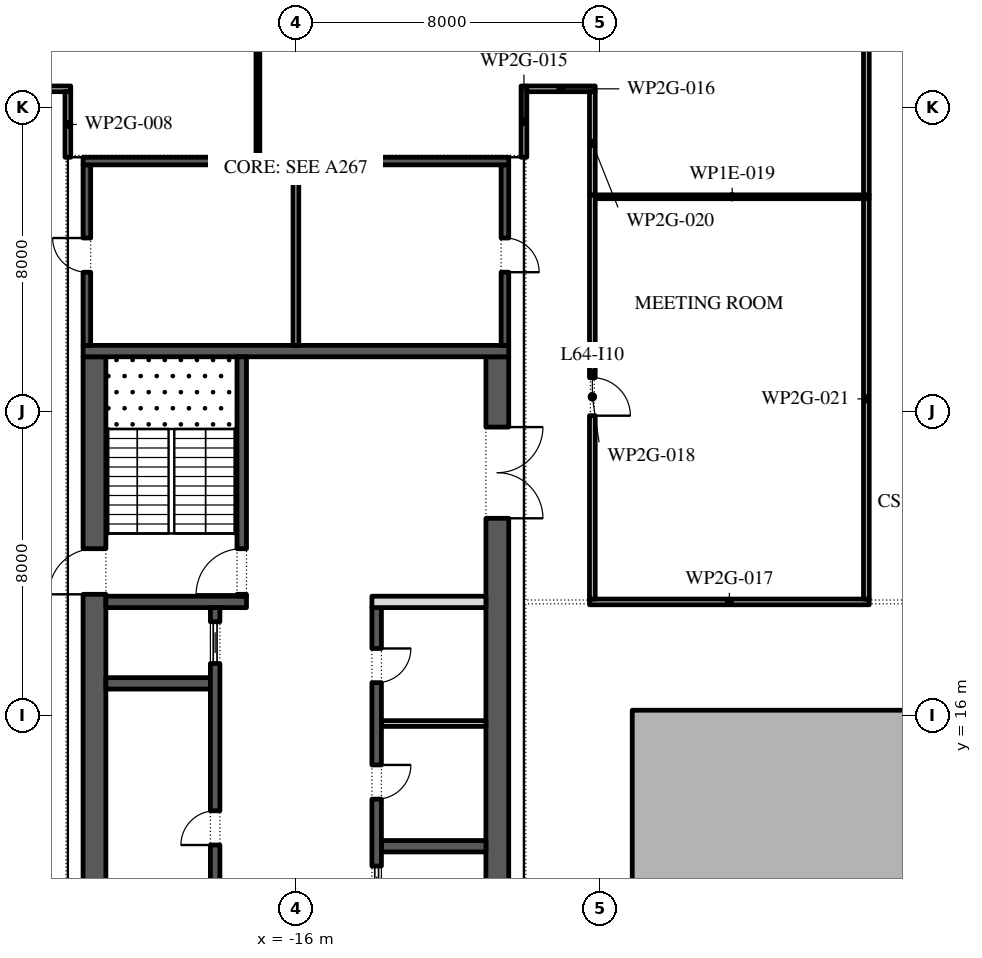
"""IFC4 building model, lengths in metres.
Left out: names, types, materials, properties, quantities, classifications, styles, units other than length and angle.
Written with IfcOpenShell. Run it as: python <this file> out.ifc"""

import sys

from ifc_helpers import new_model, si_unit, direction, frame, frame_2d, origin, place, context, subcontext, project, spatial, polyline, rectangle, outline, extrude, element, fill, save


model = new_model("IFC4")
c1 = context("Model", 3, precision=1e-05, world=origin(), true_north=direction((0.0, 1.0)))
c2 = subcontext(c1, "Body", "Model", "MODEL_VIEW")
j1 = project(units=[si_unit("LENGTHUNIT", "METRE"), si_unit("PLANEANGLEUNIT", "RADIAN")], contexts=[c1])
p1 = place(None, origin())
s1 = spatial("IfcSite", under=j1, at=p1, CompositionType="ELEMENT")
p2 = place(p1, origin())
s2 = spatial("IfcBuilding", under=s1, at=p2, CompositionType="ELEMENT")
p3 = place(p2, frame((0.0, 0.0, 293.4)))
s3 = spatial("IfcBuildingStorey", under=s2, at=p3, CompositionType="ELEMENT", Elevation=293.4)
p4 = place(p3, origin())
e1 = element("IfcWall", 1, at=p4, inside=s3, PredefinedType="STANDARD", context=c2, shape_type="SweptSolid", body=[
    extrude(outline(polyline([(-7.15, -2.15), (7.15, -2.15), (7.15, 16.15), (-7.15, 16.15), (-7.15, -2.15)]), holes=[polyline([(-7.0, -2.0), (-7.0, 16.0), (7.0, 16.0), (7.0, -2.0), (-7.0, -2.0)])]), origin(), (0.0, 0.0, 1.0), 3.75),
])
p5 = place(p3, frame((-21.3, -2.45, 0.0), z_axis=(0.0, 0.0, 1.0), x_axis=(0.0, 1.0, 0.0)))
e2 = element("IfcWall", 2, at=p5, inside=s3, PredefinedType="SHEAR", context=c2, shape_type="SweptSolid", body=[
    extrude(rectangle(XDim=27.9, YDim=0.6, at=frame_2d((13.95, 0.0))), origin(), (0.0, 0.0, 1.0), 3.75),
])
p6 = place(p5, frame((5.05, 0.0, 0.0)))
e3 = element("IfcOpeningElement", 3, at=p6, cuts=e2, PredefinedType="OPENING", context=c2, shape_type="SweptSolid", body=[
    extrude(rectangle(XDim=1.2, YDim=2.1, at=frame_2d((0.6, 1.05))), frame((0.0, 0.31, 0.0), z_axis=(0.0, -1.0, 0.0), x_axis=(1.0, 0.0, 0.0)), (0.0, 0.0, 1.0), 0.62),
])
p7 = place(p5, frame((21.65, 0.0, 0.0)))
e4 = element("IfcOpeningElement", 4, at=p7, cuts=e2, PredefinedType="OPENING", context=c2, shape_type="SweptSolid", body=[
    extrude(rectangle(XDim=1.2, YDim=2.1, at=frame_2d((0.6, 1.05))), frame((0.0, 0.31, 0.0), z_axis=(0.0, -1.0, 0.0), x_axis=(1.0, 0.0, 0.0)), (0.0, 0.0, 1.0), 0.62),
])
p8 = place(p3, frame((-10.7, -2.45, 0.0), z_axis=(0.0, 0.0, 1.0), x_axis=(0.0, 1.0, 0.0)))
e5 = element("IfcWall", 5, at=p8, inside=s3, PredefinedType="SHEAR", context=c2, shape_type="SweptSolid", body=[
    extrude(rectangle(XDim=27.9, YDim=0.6, at=frame_2d((13.95, 0.0))), origin(), (0.0, 0.0, 1.0), 3.75),
])
p9 = place(p8, frame((23.65, 0.0, 0.0)))
e6 = element("IfcOpeningElement", 6, at=p9, cuts=e5, PredefinedType="OPENING", context=c2, shape_type="SweptSolid", body=[
    extrude(rectangle(XDim=2.4, YDim=2.1, at=frame_2d((1.2, 1.05))), frame((0.0, 0.31, 0.0), z_axis=(0.0, -1.0, 0.0), x_axis=(1.0, 0.0, 0.0)), (0.0, 0.0, 1.0), 0.62),
])
p10 = place(p8, frame((1.087, 0.0, 0.0)))
e7 = element("IfcOpeningElement", 7, at=p10, cuts=e5, PredefinedType="OPENING", context=c2, shape_type="SweptSolid", body=[
    extrude(rectangle(XDim=0.9, YDim=2.1, at=frame_2d((0.45, 1.05))), frame((0.0, 0.31, 0.0), z_axis=(0.0, -1.0, 0.0), x_axis=(1.0, 0.0, 0.0)), (0.0, 0.0, 1.0), 0.62),
])
p11 = place(p8, frame((4.262, 0.0, 0.0)))
e8 = element("IfcOpeningElement", 8, at=p11, cuts=e5, PredefinedType="OPENING", context=c2, shape_type="SweptSolid", body=[
    extrude(rectangle(XDim=1.0, YDim=2.1, at=frame_2d((0.5, 1.05))), frame((0.0, 0.31, 0.0), z_axis=(0.0, -1.0, 0.0), x_axis=(1.0, 0.0, 0.0)), (0.0, 0.0, 1.0), 0.62),
])
p12 = place(p3, frame((-21.6, 25.6, 0.0), z_axis=(0.0, 0.0, 1.0), x_axis=(1.0, 0.0, 0.0)))
e9 = element("IfcWall", 9, at=p12, inside=s3, PredefinedType="SHEAR", context=c2, shape_type="SweptSolid", body=[
    extrude(rectangle(XDim=11.2, YDim=0.3, at=frame_2d((5.6, 0.0))), origin(), (0.0, 0.0, 1.0), 3.75),
])
p13 = place(p3, frame((-21.0, 19.0, 0.0), z_axis=(0.0, 0.0, 1.0), x_axis=(1.0, 0.0, 0.0)))
e10 = element("IfcWall", 10, at=p13, inside=s3, PredefinedType="SHEAR", context=c2, shape_type="SweptSolid", body=[
    extrude(rectangle(XDim=3.7, YDim=0.3, at=frame_2d((1.85, 0.0))), origin(), (0.0, 0.0, 1.0), 3.75),
])
p14 = place(p3, frame((-17.425, 19.15, 0.0), z_axis=(0.0, 0.0, 1.0), x_axis=(0.0, 1.0, 0.0)))
e11 = element("IfcWall", 11, at=p14, inside=s3, PredefinedType="SHEAR", context=c2, shape_type="SweptSolid", body=[
    extrude(rectangle(XDim=6.3, YDim=0.25, at=frame_2d((3.15, 0.0))), origin(), (0.0, 0.0, 1.0), 3.75),
])
p15 = place(p14, frame((0.05, 0.0, 0.0)))
e12 = element("IfcOpeningElement", 12, at=p15, cuts=e11, PredefinedType="OPENING", context=c2, shape_type="SweptSolid", body=[
    extrude(rectangle(XDim=1.2, YDim=2.1, at=frame_2d((0.6, 1.05))), frame((0.0, 0.135, 0.0), z_axis=(0.0, -1.0, 0.0), x_axis=(1.0, 0.0, 0.0)), (0.0, 0.0, 1.0), 0.27),
])
p16 = place(p3, frame((-21.0, 16.857, 0.0), z_axis=(0.0, 0.0, 1.0), x_axis=(1.0, 0.0, 0.0)))
e13 = element("IfcWall", 13, at=p16, inside=s3, PredefinedType="SHEAR", context=c2, shape_type="SweptSolid", body=[
    extrude(rectangle(XDim=2.75, YDim=0.3, at=frame_2d((1.375, 0.0))), origin(), (0.0, 0.0, 1.0), 3.75),
])
p17 = place(p3, frame((-18.125, 4.15, 0.0), z_axis=(0.0, 0.0, 1.0), x_axis=(0.0, 1.0, 0.0)))
e14 = element("IfcWall", 14, at=p17, inside=s3, PredefinedType="SHEAR", context=c2, shape_type="SweptSolid", body=[
    extrude(rectangle(XDim=14.7, YDim=0.25, at=frame_2d((7.35, 0.0))), origin(), (0.0, 0.0, 1.0), 3.75),
])
p18 = place(p17, frame((3.246, 0.0, 0.0)))
e15 = element("IfcOpeningElement", 15, at=p18, cuts=e14, PredefinedType="OPENING", context=c2, shape_type="SweptSolid", body=[
    extrude(rectangle(XDim=0.9, YDim=2.1, at=frame_2d((0.45, 1.05))), frame((0.0, 0.135, 0.0), z_axis=(0.0, -1.0, 0.0), x_axis=(1.0, 0.0, 0.0)), (0.0, 0.0, 1.0), 0.27),
])
p19 = place(p17, frame((8.454, 0.0, 0.0)))
e16 = element("IfcOpeningElement", 16, at=p19, cuts=e14, PredefinedType="OPENING", context=c2, shape_type="SweptSolid", body=[
    extrude(rectangle(XDim=0.9, YDim=2.1, at=frame_2d((0.45, 1.05))), frame((0.0, 0.135, 0.0), z_axis=(0.0, -1.0, 0.0), x_axis=(1.0, 0.0, 0.0)), (0.0, 0.0, 1.0), 0.27),
])
p20 = place(p17, frame((0.371, 0.0, 0.0)))
e17 = element("IfcOpeningElement", 17, at=p20, cuts=e14, PredefinedType="OPENING", context=c2, shape_type="SweptSolid", body=[
    extrude(rectangle(XDim=1.1, YDim=2.1, at=frame_2d((0.55, 1.05))), frame((0.0, 0.135, 0.0), z_axis=(0.0, -1.0, 0.0), x_axis=(1.0, 0.0, 0.0)), (0.0, 0.0, 1.0), 0.27),
])
p21 = place(p17, frame((13.229, 0.0, 0.0)))
e18 = element("IfcOpeningElement", 18, at=p21, cuts=e14, PredefinedType="OPENING", context=c2, shape_type="SweptSolid", body=[
    extrude(rectangle(XDim=1.1, YDim=2.1, at=frame_2d((0.55, 1.05))), frame((0.0, 0.135, 0.0), z_axis=(0.0, -1.0, 0.0), x_axis=(1.0, 0.0, 0.0)), (0.0, 0.0, 1.0), 0.27),
])
p22 = place(p3, frame((-13.75, 12.571, 0.0), z_axis=(0.0, 0.0, 1.0), x_axis=(1.0, 0.0, 0.0)))
e19 = element("IfcWall", 19, at=p22, inside=s3, PredefinedType="SHEAR", context=c2, shape_type="SweptSolid", body=[
    extrude(rectangle(XDim=2.75, YDim=0.3, at=frame_2d((1.375, 0.0))), origin(), (0.0, 0.0, 1.0), 3.75),
])
p23 = place(p3, frame((-13.875, -2.45, 0.0), z_axis=(0.0, 0.0, 1.0), x_axis=(0.0, 1.0, 0.0)))
e20 = element("IfcWall", 20, at=p23, inside=s3, PredefinedType="SHEAR", context=c2, shape_type="SweptSolid", body=[
    extrude(rectangle(XDim=21.3, YDim=0.25, at=frame_2d((10.65, 0.0))), origin(), (0.0, 0.0, 1.0), 3.75),
])
p24 = place(p23, frame((16.261, 0.0, 0.0)))
e21 = element("IfcOpeningElement", 21, at=p24, cuts=e20, PredefinedType="OPENING", context=c2, shape_type="SweptSolid", body=[
    extrude(rectangle(XDim=0.9, YDim=2.1, at=frame_2d((0.45, 1.05))), frame((0.0, 0.135, 0.0), z_axis=(0.0, -1.0, 0.0), x_axis=(1.0, 0.0, 0.0)), (0.0, 0.0, 1.0), 0.27),
])
p25 = place(p23, frame((19.325, 0.0, 0.0)))
e22 = element("IfcOpeningElement", 22, at=p25, cuts=e20, PredefinedType="OPENING", context=c2, shape_type="SweptSolid", body=[
    extrude(rectangle(XDim=0.9, YDim=2.1, at=frame_2d((0.45, 1.05))), frame((0.0, 0.135, 0.0), z_axis=(0.0, -1.0, 0.0), x_axis=(1.0, 0.0, 0.0)), (0.0, 0.0, 1.0), 0.27),
])
p26 = place(p23, frame((6.971, 0.0, 0.0)))
e23 = element("IfcOpeningElement", 23, at=p26, cuts=e20, PredefinedType="OPENING", context=c2, shape_type="SweptSolid", body=[
    extrude(rectangle(XDim=1.1, YDim=2.1, at=frame_2d((0.55, 1.05))), frame((0.0, 0.135, 0.0), z_axis=(0.0, -1.0, 0.0), x_axis=(1.0, 0.0, 0.0)), (0.0, 0.0, 1.0), 0.27),
])
p27 = place(p23, frame((9.114, 0.0, 0.0)))
e24 = element("IfcOpeningElement", 24, at=p27, cuts=e20, PredefinedType="OPENING", context=c2, shape_type="SweptSolid", body=[
    extrude(rectangle(XDim=1.1, YDim=2.1, at=frame_2d((0.55, 1.05))), frame((0.0, 0.135, 0.0), z_axis=(0.0, -1.0, 0.0), x_axis=(1.0, 0.0, 0.0)), (0.0, 0.0, 1.0), 0.27),
])
p28 = place(p23, frame((11.257, 0.0, 0.0)))
e25 = element("IfcOpeningElement", 25, at=p28, cuts=e20, PredefinedType="OPENING", context=c2, shape_type="SweptSolid", body=[
    extrude(rectangle(XDim=1.1, YDim=2.1, at=frame_2d((0.55, 1.05))), frame((0.0, 0.135, 0.0), z_axis=(0.0, -1.0, 0.0), x_axis=(1.0, 0.0, 0.0)), (0.0, 0.0, 1.0), 0.27),
])
p29 = place(p23, frame((13.4, 0.0, 0.0)))
e26 = element("IfcOpeningElement", 26, at=p29, cuts=e20, PredefinedType="OPENING", context=c2, shape_type="SweptSolid", body=[
    extrude(rectangle(XDim=1.1, YDim=2.1, at=frame_2d((0.55, 1.05))), frame((0.0, 0.135, 0.0), z_axis=(0.0, -1.0, 0.0), x_axis=(1.0, 0.0, 0.0)), (0.0, 0.0, 1.0), 0.27),
])
p30 = place(p3, frame((-14.0, 19.0, 0.0), z_axis=(0.0, 0.0, 1.0), x_axis=(1.0, 0.0, 0.0)))
e27 = element("IfcWall", 27, at=p30, inside=s3, PredefinedType="PARTITIONING", context=c2, shape_type="SweptSolid", body=[
    extrude(rectangle(XDim=3.0, YDim=0.3, at=frame_2d((1.5, 0.0))), origin(), (0.0, 0.0, 1.0), 3.75),
])
p31 = place(p3, frame((-13.75, 15.8, 0.0), z_axis=(0.0, 0.0, 1.0), x_axis=(1.0, 0.0, 0.0)))
e28 = element("IfcWall", 28, at=p31, inside=s3, PredefinedType="PARTITIONING", context=c2, shape_type="SweptSolid", body=[
    extrude(rectangle(XDim=2.75, YDim=0.15, at=frame_2d((1.375, 0.0))), origin(), (0.0, 0.0, 1.0), 3.75),
])
p32 = place(p3, frame((-21.5, 25.75, 0.0), z_axis=(0.0, 0.0, 1.0), x_axis=(0.0, 1.0, 0.0)))
e29 = element("IfcWall", 29, at=p32, inside=s3, PredefinedType="SHEAR", context=c2, shape_type="SweptSolid", body=[
    extrude(rectangle(XDim=4.75, YDim=0.2, at=frame_2d((2.375, 0.0))), origin(), (0.0, 0.0, 1.0), 3.75),
])
p33 = place(p32, frame((1.925, 0.0, 0.0)))
e30 = element("IfcOpeningElement", 30, at=p33, cuts=e29, PredefinedType="OPENING", context=c2, shape_type="SweptSolid", body=[
    extrude(rectangle(XDim=0.9, YDim=2.1, at=frame_2d((0.45, 1.05))), frame((0.0, 0.11, 0.0), z_axis=(0.0, -1.0, 0.0), x_axis=(1.0, 0.0, 0.0)), (0.0, 0.0, 1.0), 0.22),
])
p34 = place(p3, frame((-10.5, 25.75, 0.0), z_axis=(0.0, 0.0, 1.0), x_axis=(0.0, 1.0, 0.0)))
e31 = element("IfcWall", 31, at=p34, inside=s3, PredefinedType="SHEAR", context=c2, shape_type="SweptSolid", body=[
    extrude(rectangle(XDim=4.75, YDim=0.2, at=frame_2d((2.375, 0.0))), origin(), (0.0, 0.0, 1.0), 3.75),
])
p35 = place(p34, frame((1.925, 0.0, 0.0)))
e32 = element("IfcOpeningElement", 32, at=p35, cuts=e31, PredefinedType="OPENING", context=c2, shape_type="SweptSolid", body=[
    extrude(rectangle(XDim=0.9, YDim=2.1, at=frame_2d((0.45, 1.05))), frame((0.0, 0.11, 0.0), z_axis=(0.0, -1.0, 0.0), x_axis=(1.0, 0.0, 0.0)), (0.0, 0.0, 1.0), 0.22),
])
p36 = place(p3, frame((-21.6, 30.6, 0.0), z_axis=(0.0, 0.0, 1.0), x_axis=(1.0, 0.0, 0.0)))
e33 = element("IfcWall", 33, at=p36, inside=s3, PredefinedType="SHEAR", context=c2, shape_type="SweptSolid", body=[
    extrude(rectangle(XDim=11.2, YDim=0.2, at=frame_2d((5.6, 0.0))), origin(), (0.0, 0.0, 1.0), 3.75),
])
p37 = place(p3, frame((-16.0, 25.75, 0.0), z_axis=(0.0, 0.0, 1.0), x_axis=(0.0, 1.0, 0.0)))
e34 = element("IfcWall", 34, at=p37, inside=s3, PredefinedType="PARTITIONING", context=c2, shape_type="SweptSolid", body=[
    extrude(rectangle(XDim=4.75, YDim=0.15, at=frame_2d((2.375, 0.0))), origin(), (0.0, 0.0, 1.0), 3.75),
])
p38 = place(p3, frame((-23.8, 32.5, 0.0), z_axis=(0.0, 0.0, 1.0), x_axis=(1.0, 0.0, 0.0)))
e35 = element("IfcWall", 35, at=p38, inside=s3, PredefinedType="PARTITIONING", context=c2, shape_type="SweptSolid", body=[
    extrude(rectangle(XDim=1.875, YDim=0.15, at=frame_2d((0.938, 0.0))), origin(), (0.0, 0.0, 1.0), 3.75),
])
p39 = place(p3, frame((-22.0, 32.425, 0.0), z_axis=(0.0, 0.0, 1.0), x_axis=(0.0, -1.0, 0.0)))
e36 = element("IfcWall", 36, at=p39, inside=s3, PredefinedType="PARTITIONING", context=c2, shape_type="SweptSolid", body=[
    extrude(rectangle(XDim=1.725, YDim=0.15, at=frame_2d((0.863, 0.0))), origin(), (0.0, 0.0, 1.0), 3.75),
])
p40 = place(p3, frame((-17.0, 41.95, 0.0), z_axis=(0.0, 0.0, 1.0), x_axis=(0.0, -1.0, 0.0)))
e37 = element("IfcWall", 37, at=p40, inside=s3, PredefinedType="PARTITIONING", context=c2, shape_type="SweptSolid", body=[
    extrude(rectangle(XDim=11.25, YDim=0.1, at=frame_2d((5.625, 0.0))), origin(), (0.0, 0.0, 1.0), 3.75),
])
p41 = place(p40, frame((3.9, 0.0, 0.0)))
e38 = element("IfcOpeningElement", 38, at=p41, cuts=e37, PredefinedType="OPENING", context=c2, shape_type="SweptSolid", body=[
    extrude(rectangle(XDim=0.9, YDim=2.1, at=frame_2d((0.45, 1.05))), frame((0.0, 0.06, 0.0), z_axis=(0.0, -1.0, 0.0), x_axis=(1.0, 0.0, 0.0)), (0.0, 0.0, 1.0), 0.12),
])
p42 = place(p3, frame((-10.0, 30.7, 0.0), z_axis=(0.0, 0.0, 1.0), x_axis=(0.0, 1.0, 0.0)))
e39 = element("IfcWall", 39, at=p42, inside=s3, PredefinedType="PARTITIONING", context=c2, shape_type="SweptSolid", body=[
    extrude(rectangle(XDim=1.875, YDim=0.15, at=frame_2d((0.938, 0.0))), origin(), (0.0, 0.0, 1.0), 3.75),
])
p43 = place(p3, frame((-9.925, 32.5, 0.0), z_axis=(0.0, 0.0, 1.0), x_axis=(1.0, 0.0, 0.0)))
e40 = element("IfcWall", 40, at=p43, inside=s3, PredefinedType="PARTITIONING", context=c2, shape_type="SweptSolid", body=[
    extrude(rectangle(XDim=1.8, YDim=0.15, at=frame_2d((0.9, 0.0))), origin(), (0.0, 0.0, 1.0), 3.75),
])
p44 = place(p3, frame((-8.275, 19.0, 0.0), z_axis=(0.0, 0.0, 1.0), x_axis=(1.0, 0.0, 0.0)))
e41 = element("IfcWall", 41, at=p44, inside=s3, PredefinedType="PARTITIONING", context=c2, shape_type="SweptSolid", body=[
    extrude(rectangle(XDim=7.36, YDim=0.15, at=frame_2d((3.68, 0.0))), origin(), (0.0, 0.0, 1.0), 3.75),
])
p45 = place(p3, frame((-8.2, 29.71, 0.0), z_axis=(0.0, 0.0, 1.0), x_axis=(0.0, -1.0, 0.0)))
e42 = element("IfcWall", 42, at=p45, inside=s3, PredefinedType="PARTITIONING", context=c2, shape_type="SweptSolid", body=[
    extrude(rectangle(XDim=10.635, YDim=0.15, at=frame_2d((5.317, 0.0))), origin(), (0.0, 0.0, 1.0), 3.75),
])
p46 = place(p45, frame((4.81, 0.0, 0.0)))
e43 = element("IfcOpeningElement", 43, at=p46, cuts=e42, PredefinedType="OPENING", context=c2, shape_type="SweptSolid", body=[
    extrude(rectangle(XDim=1.0, YDim=2.1, at=frame_2d((0.5, 1.05))), frame((0.0, 0.085, 0.0), z_axis=(0.0, -1.0, 0.0), x_axis=(1.0, 0.0, 0.0)), (0.0, 0.0, 1.0), 0.17),
])
p47 = place(p3, frame((-8.125, 29.66, 0.0), z_axis=(0.0, 0.0, 1.0), x_axis=(1.0, 0.0, 0.0)))
e44 = element("IfcWall", 44, at=p47, inside=s3, PredefinedType="PARTITIONING", context=c2, shape_type="SweptSolid", body=[
    extrude(rectangle(XDim=7.21, YDim=0.1, at=frame_2d((3.605, 0.0))), origin(), (0.0, 0.0, 1.0), 3.75),
])
p48 = place(p3, frame((-8.2, 32.425, 0.0), z_axis=(0.0, 0.0, 1.0), x_axis=(0.0, -1.0, 0.0)))
e45 = element("IfcWall", 45, at=p48, inside=s3, PredefinedType="PARTITIONING", context=c2, shape_type="SweptSolid", body=[
    extrude(rectangle(XDim=2.715, YDim=0.15, at=frame_2d((1.357, 0.0))), origin(), (0.0, 0.0, 1.0), 3.75),
])
p49 = place(p3, frame((-0.99, 19.075, 0.0), z_axis=(0.0, 0.0, 1.0), x_axis=(0.0, 1.0, 0.0)))
e46 = element("IfcWall", 46, at=p49, inside=s3, PredefinedType="PARTITIONING", context=c2, shape_type="SweptSolid", body=[
    extrude(rectangle(XDim=10.535, YDim=0.15, at=frame_2d((5.268, 0.0))), origin(), (0.0, 0.0, 1.0), 3.75),
])
p50 = place(p3, frame((-0.99, 29.71, 0.0), z_axis=(0.0, 0.0, 1.0), x_axis=(0.0, 1.0, 0.0)))
e47 = element("IfcWall", 47, at=p50, inside=s3, PredefinedType="PARTITIONING", context=c2, shape_type="SweptSolid", body=[
    extrude(rectangle(XDim=12.24, YDim=0.15, at=frame_2d((6.12, 0.0))), origin(), (0.0, 0.0, 1.0), 3.75),
])
p51 = place(p50, frame((6.89, 0.0, 0.0)))
e48 = element("IfcOpeningElement", 48, at=p51, cuts=e47, PredefinedType="OPENING", context=c2, shape_type="SweptSolid", body=[
    extrude(rectangle(XDim=1.0, YDim=2.1, at=frame_2d((0.5, 1.05))), frame((0.0, 0.085, 0.0), z_axis=(0.0, -1.0, 0.0), x_axis=(1.0, 0.0, 0.0)), (0.0, 0.0, 1.0), 0.17),
])
p52 = place(p19, origin())
e49 = element("IfcDoor", 49, at=p52, inside=s3, OperationType="SINGLE_SWING_RIGHT", PredefinedType="DOOR", context=c2, shape_type="SweptSolid", body=[
    extrude(rectangle(XDim=0.9, YDim=2.1, at=frame_2d((0.45, 1.05))), frame((0.0, 0.125, 0.0), z_axis=(0.0, -1.0, 0.0), x_axis=(1.0, 0.0, 0.0)), (0.0, 0.0, 1.0), 0.05),
])
fill(e16, e49)
p53 = place(p21, origin())
e50 = element("IfcDoor", 50, at=p53, inside=s3, OperationType="SLIDING_TO_LEFT", PredefinedType="DOOR", context=c2, shape_type="SweptSolid", body=[
    extrude(rectangle(XDim=1.1, YDim=2.1, at=frame_2d((0.55, 1.05))), frame((0.0, 0.025, 0.0), z_axis=(0.0, -1.0, 0.0), x_axis=(1.0, 0.0, 0.0)), (0.0, 0.0, 1.0), 0.05),
])
fill(e18, e50)
p54 = place(p24, frame((0.9, -0.2, 0.0), z_axis=(0.0, 0.0, 1.0), x_axis=(-1.0, 0.0, 0.0)))
e51 = element("IfcDoor", 51, at=p54, inside=s3, OperationType="SINGLE_SWING_RIGHT", PredefinedType="DOOR", context=c2, shape_type="SweptSolid", body=[
    extrude(rectangle(XDim=0.9, YDim=2.1, at=frame_2d((0.45, 1.05))), frame((0.0, -0.075, 0.0), z_axis=(0.0, -1.0, 0.0), x_axis=(1.0, 0.0, 0.0)), (0.0, 0.0, 1.0), 0.05),
])
fill(e21, e51)
p55 = place(p25, frame((0.9, -0.2, 0.0), z_axis=(0.0, 0.0, 1.0), x_axis=(-1.0, 0.0, 0.0)))
e52 = element("IfcDoor", 52, at=p55, inside=s3, OperationType="SINGLE_SWING_RIGHT", PredefinedType="DOOR", context=c2, shape_type="SweptSolid", body=[
    extrude(rectangle(XDim=0.9, YDim=2.1, at=frame_2d((0.45, 1.05))), frame((0.0, -0.075, 0.0), z_axis=(0.0, -1.0, 0.0), x_axis=(1.0, 0.0, 0.0)), (0.0, 0.0, 1.0), 0.05),
])
fill(e22, e52)
p56 = place(p29, origin())
e53 = element("IfcDoor", 53, at=p56, inside=s3, OperationType="SLIDING_TO_LEFT", PredefinedType="DOOR", context=c2, shape_type="SweptSolid", body=[
    extrude(rectangle(XDim=1.1, YDim=2.1, at=frame_2d((0.55, 1.05))), frame((0.0, 0.025, 0.0), z_axis=(0.0, -1.0, 0.0), x_axis=(1.0, 0.0, 0.0)), (0.0, 0.0, 1.0), 0.05),
])
fill(e26, e53)
p57 = place(p9, frame((2.4, 0.0, 0.0), z_axis=(0.0, 0.0, 1.0), x_axis=(-1.0, 0.0, 0.0)))
e54 = element("IfcDoor", 54, at=p57, inside=s3, OperationType="DOUBLE_DOOR_SINGLE_SWING", PredefinedType="DOOR", context=c2, shape_type="SweptSolid", body=[
    extrude(rectangle(XDim=2.4, YDim=2.1, at=frame_2d((1.2, 1.05))), frame((0.0, 0.025, 0.0), z_axis=(0.0, -1.0, 0.0), x_axis=(1.0, 0.0, 0.0)), (0.0, 0.0, 1.0), 0.05),
])
fill(e6, e54)
p58 = place(p15, origin())
e55 = element("IfcDoor", 55, at=p58, inside=s3, OperationType="SINGLE_SWING_RIGHT", PredefinedType="DOOR", context=c2, shape_type="SweptSolid", body=[
    extrude(rectangle(XDim=1.2, YDim=2.1, at=frame_2d((0.6, 1.05))), frame((0.0, 0.025, 0.0), z_axis=(0.0, -1.0, 0.0), x_axis=(1.0, 0.0, 0.0)), (0.0, 0.0, 1.0), 0.05),
])
fill(e12, e55)
p59 = place(p7, origin())
e56 = element("IfcDoor", 56, at=p59, inside=s3, OperationType="SINGLE_SWING_RIGHT", PredefinedType="DOOR", context=c2, shape_type="SweptSolid", body=[
    extrude(rectangle(XDim=1.2, YDim=2.1, at=frame_2d((0.6, 1.05))), frame((0.0, 0.025, 0.0), z_axis=(0.0, -1.0, 0.0), x_axis=(1.0, 0.0, 0.0)), (0.0, 0.0, 1.0), 0.05),
])
fill(e4, e56)
p60 = place(p33, origin())
e57 = element("IfcDoor", 57, at=p60, inside=s3, OperationType="SINGLE_SWING_LEFT", PredefinedType="DOOR", context=c2, shape_type="SweptSolid", body=[
    extrude(rectangle(XDim=0.9, YDim=2.1, at=frame_2d((0.45, 1.05))), frame((0.0, -0.05, 0.0), z_axis=(0.0, -1.0, 0.0), x_axis=(1.0, 0.0, 0.0)), (0.0, 0.0, 1.0), 0.05),
])
fill(e30, e57)
p61 = place(p35, frame((0.9, 0.15, 0.0), z_axis=(0.0, 0.0, 1.0), x_axis=(-1.0, 0.0, 0.0)))
e58 = element("IfcDoor", 58, at=p61, inside=s3, OperationType="SINGLE_SWING_LEFT", PredefinedType="DOOR", context=c2, shape_type="SweptSolid", body=[
    extrude(rectangle(XDim=0.9, YDim=2.1, at=frame_2d((0.45, 1.05))), frame((0.0, 0.1, 0.0), z_axis=(0.0, -1.0, 0.0), x_axis=(1.0, 0.0, 0.0)), (0.0, 0.0, 1.0), 0.05),
])
fill(e32, e58)
p62 = place(p46, origin())
e59 = element("IfcDoor", 59, at=p62, inside=s3, OperationType="SINGLE_SWING_LEFT", PredefinedType="DOOR", context=c2, shape_type="SweptSolid", body=[
    extrude(rectangle(XDim=1.0, YDim=2.1, at=frame_2d((0.5, 1.05))), frame((0.0, 0.025, 0.0), z_axis=(0.0, -1.0, 0.0), x_axis=(1.0, 0.0, 0.0)), (0.0, 0.0, 1.0), 0.05),
])
fill(e43, e59)
save(model, sys.argv[1])
